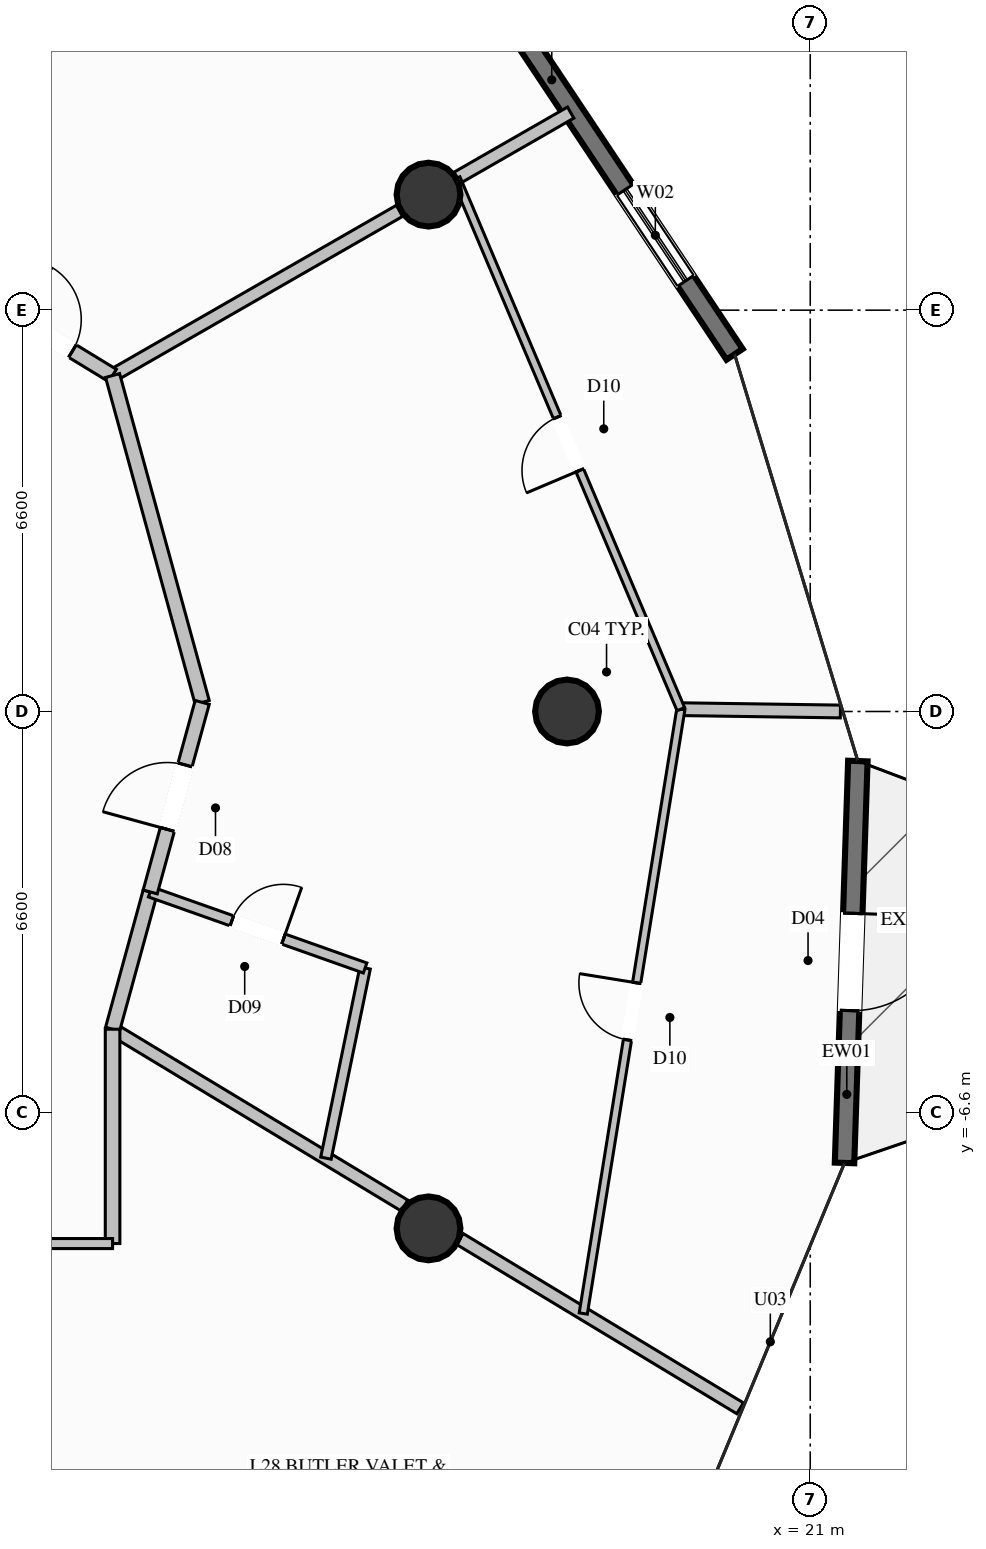
"""IFC4 building model, lengths in metres.
Left out: names, types, materials, properties, quantities, classifications, styles, units other than length and angle.
Written with IfcOpenShell. Run it as: python <this file> out.ifc"""

import sys

from ifc_helpers import new_model, si_unit, direction, frame, frame_2d, origin, origin_2d, place, context, subcontext, project, spatial, rectangle, circle, extrude, element, fill, save


model = new_model("IFC4")
c1 = context("Model", 3, precision=1e-05, world=origin(), true_north=direction((0.0, 1.0)))
c2 = subcontext(c1, "Body", "Model", "MODEL_VIEW")
j1 = project(units=[si_unit("LENGTHUNIT", "METRE"), si_unit("PLANEANGLEUNIT", "RADIAN")], contexts=[c1])
p1 = place(None, origin())
s1 = spatial("IfcSite", under=j1, at=p1, CompositionType="ELEMENT")
p2 = place(p1, origin())
s2 = spatial("IfcBuilding", under=s1, at=p2, CompositionType="ELEMENT")
p3 = place(p2, frame((0.0, 0.0, 113.4)))
s3 = spatial("IfcBuildingStorey", under=s2, at=p3, CompositionType="ELEMENT", Elevation=113.4)
for number, where, z_axis, x_axis in (
    (1, (17.0, 0.0, 0.0), (0.0, 0.0, 1.0), (1.0, 0.0, 0.0)),
    (2, (14.722, 8.5, 0.0), (0.0, 0.0, 1.0), (1.0, 0.0, 0.0)),
    (3, (14.722, -8.5, 0.0), (0.0, 0.0, 1.0), (1.0, 0.0, 0.0)),
):
    element("IfcColumn", number, at=place(p3, frame(where, z_axis=z_axis, x_axis=x_axis)), inside=s3, PredefinedType="COLUMN", context=c2, shape_type="SweptSolid", body=[
        extrude(circle(Radius=0.525, at=origin_2d()), origin(), (0.0, 0.0, 1.0), 3.6),
    ])
p4 = place(p3, frame((21.783, -0.815, 0.0), z_axis=(0.0, 0.0, 1.0), x_axis=(-0.033116914102, -0.999451484566, 0.0)))
e4 = element("IfcWall", 4, at=p4, inside=s3, PredefinedType="SOLIDWALL", context=c2, shape_type="SweptSolid", body=[
    extrude(rectangle(XDim=6.613, YDim=0.32, at=frame_2d((3.306, 0.0))), origin(), (0.0, 0.0, 1.0), 3.35),
])
p5 = place(p4, frame((2.506, 0.0, 0.0)))
e5 = element("IfcOpeningElement", 5, at=p5, cuts=e4, PredefinedType="OPENING", context=c2, shape_type="SweptSolid", body=[
    extrude(rectangle(XDim=1.6, YDim=2.3, at=frame_2d((0.8, 1.15))), frame((0.0, 0.17, 0.0), z_axis=(0.0, -1.0, 0.0), x_axis=(1.0, 0.0, 0.0)), (0.0, 0.0, 1.0), 0.34),
])
p6 = place(p3, frame((15.683, 11.988, 0.0), z_axis=(0.0, 0.0, 1.0), x_axis=(0.554416410256, -0.832239415096, 0.0)))
e6 = element("IfcWall", 6, at=p6, inside=s3, PredefinedType="SOLIDWALL", context=c2, shape_type="SweptSolid", body=[
    extrude(rectangle(XDim=7.346, YDim=0.32, at=frame_2d((3.673, 0.0))), origin(), (0.0, 0.0, 1.0), 3.35),
])
p7 = place(p6, frame((4.095, 0.0, 0.35)))
e7 = element("IfcOpeningElement", 7, at=p7, cuts=e6, PredefinedType="OPENING", context=c2, shape_type="SweptSolid", body=[
    extrude(rectangle(XDim=1.8, YDim=2.6, at=frame_2d((0.9, 1.3))), frame((0.0, 0.17, 0.0), z_axis=(0.0, -1.0, 0.0), x_axis=(1.0, 0.0, 0.0)), (0.0, 0.0, 1.0), 0.34),
])
p8 = place(p3, frame((9.526, 5.525, 0.0), z_axis=(0.0, 0.0, 1.0), x_axis=(0.867314067813, 0.497761295979, 0.0)))
e8 = element("IfcWall", 8, at=p8, inside=s3, PredefinedType="PARTITIONING", context=c2, shape_type="SweptSolid", body=[
    extrude(rectangle(XDim=5.442, YDim=0.21, at=frame_2d((2.721, 0.0))), origin(), (0.0, 0.0, 1.0), 2.718),
])
p9 = place(p3, frame((15.192, 8.777, 0.0), z_axis=(0.0, 0.0, 1.0), x_axis=(0.867341902332, 0.497712793144, 0.0)))
e9 = element("IfcWall", 9, at=p9, inside=s3, PredefinedType="PARTITIONING", context=c2, shape_type="SweptSolid", body=[
    extrude(rectangle(XDim=2.154, YDim=0.21, at=frame_2d((1.077, 0.0))), origin(), (0.0, 0.0, 1.0), 3.35),
])
p10 = place(p3, frame((9.526, -5.225, 0.0), z_axis=(0.0, 0.0, 1.0), x_axis=(0.855972129744, -0.517021965782, 0.0)))
e10 = element("IfcWall", 10, at=p10, inside=s3, PredefinedType="PARTITIONING", context=c2, shape_type="SweptSolid", body=[
    extrude(rectangle(XDim=5.609, YDim=0.21, at=frame_2d((2.804, 0.0))), origin(), (0.0, 0.0, 1.0), 2.718),
])
p11 = place(p3, frame((15.238, -8.675, 0.0), z_axis=(0.0, 0.0, 1.0), x_axis=(0.855964873526, -0.517033978854, 0.0)))
e11 = element("IfcWall", 11, at=p11, inside=s3, PredefinedType="PARTITIONING", context=c2, shape_type="SweptSolid", body=[
    extrude(rectangle(XDim=5.385, YDim=0.21, at=frame_2d((2.692, 0.0))), origin(), (0.0, 0.0, 1.0), 3.35),
])
p12 = place(p3, frame((7.35, 6.85, 0.0), z_axis=(0.0, 0.0, 1.0), x_axis=(0.854057882133, -0.520177982969, 0.0)))
e12 = element("IfcWall", 12, at=p12, inside=s3, PredefinedType="PARTITIONING", context=c2, shape_type="SweptSolid", body=[
    extrude(rectangle(XDim=2.548, YDim=0.24, at=frame_2d((1.274, 0.0))), origin(), (0.0, 0.0, 1.0), 3.35),
])
p13 = place(p12, frame((0.774, 0.0, 0.0)))
e13 = element("IfcOpeningElement", 13, at=p13, cuts=e12, PredefinedType="OPENING", context=c2, shape_type="SweptSolid", body=[
    extrude(rectangle(XDim=1.0, YDim=2.2, at=frame_2d((0.5, 1.1))), frame((0.0, 0.13, 0.0), z_axis=(0.0, -1.0, 0.0), x_axis=(1.0, 0.0, 0.0)), (0.0, 0.0, 1.0), 0.26),
])
p14 = place(p3, frame((9.526, -5.225, 0.0), z_axis=(0.0, 0.0, 1.0), x_axis=(0.264431780812, 0.964404393031, 0.0)))
e14 = element("IfcWall", 14, at=p14, inside=s3, PredefinedType="PARTITIONING", context=c2, shape_type="SweptSolid", body=[
    extrude(rectangle(XDim=2.341, YDim=0.24, at=frame_2d((1.171, 0.0))), origin(), (0.0, 0.0, 1.0), 3.35),
])
p15 = place(p3, frame((13.035, -7.345, 0.0), z_axis=(0.0, 0.0, 1.0), x_axis=(0.201730596841, 0.979441047893, 0.0)))
e15 = element("IfcWall", 15, at=p15, inside=s3, PredefinedType="PLUMBINGWALL", context=c2, shape_type="SweptSolid", body=[
    extrude(rectangle(XDim=3.193, YDim=0.175, at=frame_2d((1.596, 0.0))), origin(), (0.0, 0.0, 1.0), 3.35),
])
p16 = place(p3, frame((10.145, -2.967, 0.0), z_axis=(0.0, 0.0, 1.0), x_axis=(0.94267973016, -0.333698855775, 0.0)))
e16 = element("IfcWall", 16, at=p16, inside=s3, PredefinedType="PLUMBINGWALL", context=c2, shape_type="SweptSolid", body=[
    extrude(rectangle(XDim=3.749, YDim=0.175, at=frame_2d((1.875, 0.0))), origin(), (0.0, 0.0, 1.0), 3.35),
])
p17 = place(p16, frame((1.424, 0.0, 0.0)))
e17 = element("IfcOpeningElement", 17, at=p17, cuts=e16, PredefinedType="OPENING", context=c2, shape_type="SweptSolid", body=[
    extrude(rectangle(XDim=0.9, YDim=2.1, at=frame_2d((0.45, 1.05))), frame((0.0, 0.098, 0.0), z_axis=(0.0, -1.0, 0.0), x_axis=(1.0, 0.0, 0.0)), (0.0, 0.0, 1.0), 0.195),
])
p18 = place(p3, frame((18.872, 0.038, 0.0), z_axis=(0.0, 0.0, 1.0), x_axis=(0.999894683777, -0.014512799653, 0.0)))
e18 = element("IfcWall", 18, at=p18, inside=s3, PredefinedType="PARTITIONING", context=c2, shape_type="SweptSolid", body=[
    extrude(rectangle(XDim=2.624, YDim=0.21, at=frame_2d((1.312, 0.0))), origin(), (0.0, 0.0, 1.0), 3.35),
])
p19 = place(p3, frame((11.0, 0.15, 0.0), z_axis=(0.0, 0.0, 1.0), x_axis=(-0.264488542062, 0.964388827765, 0.0)))
e19 = element("IfcWall", 19, at=p19, inside=s3, PredefinedType="PARTITIONING", context=c2, shape_type="SweptSolid", body=[
    extrude(rectangle(XDim=5.573, YDim=0.24, at=frame_2d((2.787, 0.0))), origin(), (0.0, 0.0, 1.0), 3.35),
])
p20 = place(p3, frame((10.145, -2.967, 0.0), z_axis=(0.0, 0.0, 1.0), x_axis=(0.264529660797, 0.9643775498, 0.0)))
e20 = element("IfcWall", 20, at=p20, inside=s3, PredefinedType="PARTITIONING", context=c2, shape_type="SweptSolid", body=[
    extrude(rectangle(XDim=3.232, YDim=0.24, at=frame_2d((1.616, 0.0))), origin(), (0.0, 0.0, 1.0), 3.35),
])
p21 = place(p20, frame((1.066, 0.0, 0.0)))
e21 = element("IfcOpeningElement", 21, at=p21, cuts=e20, PredefinedType="OPENING", context=c2, shape_type="SweptSolid", body=[
    extrude(rectangle(XDim=1.1, YDim=2.3, at=frame_2d((0.55, 1.15))), frame((0.0, 0.13, 0.0), z_axis=(0.0, -1.0, 0.0), x_axis=(1.0, 0.0, 0.0)), (0.0, 0.0, 1.0), 0.26),
])
p22 = place(p3, frame((17.267, -9.9, 0.0), z_axis=(0.0, 0.0, 1.0), x_axis=(0.159433733404, 0.987208632789, 0.0)))
e22 = element("IfcWall", 22, at=p22, inside=s3, PredefinedType="PARTITIONING", context=c2, shape_type="SweptSolid", body=[
    extrude(rectangle(XDim=10.067, YDim=0.135, at=frame_2d((5.033, 0.0))), origin(), (0.0, 0.0, 1.0), 3.35),
])
p23 = place(p22, frame((4.558, 0.0, 0.0)))
e23 = element("IfcOpeningElement", 23, at=p23, cuts=e22, PredefinedType="OPENING", context=c2, shape_type="SweptSolid", body=[
    extrude(rectangle(XDim=0.95, YDim=2.1, at=frame_2d((0.475, 1.05))), frame((0.0, 0.078, 0.0), z_axis=(0.0, -1.0, 0.0), x_axis=(1.0, 0.0, 0.0)), (0.0, 0.0, 1.0), 0.155),
])
p24 = place(p3, frame((18.872, 0.038, 0.0), z_axis=(0.0, 0.0, 1.0), x_axis=(-0.38987185075, 0.920869122076, 0.0)))
e24 = element("IfcWall", 24, at=p24, inside=s3, PredefinedType="PARTITIONING", context=c2, shape_type="SweptSolid", body=[
    extrude(rectangle(XDim=9.48, YDim=0.135, at=frame_2d((4.74, 0.0))), origin(), (0.0, 0.0, 1.0), 2.879),
])
p25 = place(p24, frame((4.265, 0.0, 0.0)))
e25 = element("IfcOpeningElement", 25, at=p25, cuts=e24, PredefinedType="OPENING", context=c2, shape_type="SweptSolid", body=[
    extrude(rectangle(XDim=0.95, YDim=2.1, at=frame_2d((0.475, 1.05))), frame((0.0, 0.078, 0.0), z_axis=(0.0, -1.0, 0.0), x_axis=(1.0, 0.0, 0.0)), (0.0, 0.0, 1.0), 0.155),
])
p26 = place(p3, frame((5.239, -8.75, 0.0), z_axis=(0.0, 0.0, 1.0), x_axis=(0.584922274278, -0.811089349612, 0.0)))
e26 = element("IfcWall", 26, at=p26, inside=s3, PredefinedType="PARTITIONING", context=c2, shape_type="SweptSolid", body=[
    extrude(rectangle(XDim=12.473, YDim=0.21, at=frame_2d((6.237, 0.0))), origin(), (0.0, 0.0, 1.0), 3.35),
])
p27 = place(p3, frame((9.526, -8.75, 0.0), z_axis=(0.0, 0.0, 1.0), x_axis=(0.0, 1.0, 0.0)))
e27 = element("IfcWall", 27, at=p27, inside=s3, PredefinedType="PARTITIONING", context=c2, shape_type="SweptSolid", body=[
    extrude(rectangle(XDim=3.525, YDim=0.24, at=frame_2d((1.762, 0.0))), origin(), (0.0, 0.0, 1.0), 3.35),
])
p28 = place(p3, frame((5.239, -8.75, 0.0), z_axis=(0.0, 0.0, 1.0), x_axis=(1.0, 0.0, 0.0)))
e28 = element("IfcWall", 28, at=p28, inside=s3, PredefinedType="PARTITIONING", context=c2, shape_type="SweptSolid", body=[
    extrude(rectangle(XDim=4.287, YDim=0.165, at=frame_2d((2.144, 0.0))), origin(), (0.0, 0.0, 1.0), 3.35),
])
p29 = place(p28, frame((1.668, 0.0, 0.0)))
e29 = element("IfcOpeningElement", 29, at=p29, cuts=e28, PredefinedType="OPENING", context=c2, shape_type="SweptSolid", body=[
    extrude(rectangle(XDim=0.95, YDim=2.1, at=frame_2d((0.475, 1.05))), frame((0.0, 0.093, 0.0), z_axis=(0.0, -1.0, 0.0), x_axis=(1.0, 0.0, 0.0)), (0.0, 0.0, 1.0), 0.185),
])
p30 = place(p5, origin())
e30 = element("IfcDoor", 30, at=p30, inside=s3, OperationType="SINGLE_SWING_LEFT", PredefinedType="DOOR", context=c2, shape_type="SweptSolid", body=[
    extrude(rectangle(XDim=1.6, YDim=2.3, at=frame_2d((0.8, 1.15))), frame((0.0, 0.025, 0.0), z_axis=(0.0, -1.0, 0.0), x_axis=(1.0, 0.0, 0.0)), (0.0, 0.0, 1.0), 0.05),
])
fill(e5, e30)
p31 = place(p7, origin())
e31 = element("IfcWindow", 31, at=p31, inside=s3, PartitioningType="SINGLE_PANEL", PredefinedType="WINDOW", context=c2, shape_type="SweptSolid", body=[
    extrude(rectangle(XDim=1.8, YDim=2.6, at=frame_2d((0.9, 1.3))), frame((0.0, 0.03, 0.0), z_axis=(0.0, -1.0, 0.0), x_axis=(1.0, 0.0, 0.0)), (0.0, 0.0, 1.0), 0.06),
])
fill(e7, e31)
p32 = place(p13, origin())
e32 = element("IfcDoor", 32, at=p32, inside=s3, OperationType="SINGLE_SWING_LEFT", PredefinedType="DOOR", context=c2, shape_type="SweptSolid", body=[
    extrude(rectangle(XDim=1.0, YDim=2.2, at=frame_2d((0.5, 1.1))), frame((0.0, 0.025, 0.0), z_axis=(0.0, -1.0, 0.0), x_axis=(1.0, 0.0, 0.0)), (0.0, 0.0, 1.0), 0.05),
])
fill(e13, e32)
p33 = place(p17, origin())
e33 = element("IfcDoor", 33, at=p33, inside=s3, OperationType="SINGLE_SWING_RIGHT", PredefinedType="DOOR", context=c2, shape_type="SweptSolid", body=[
    extrude(rectangle(XDim=0.9, YDim=2.1, at=frame_2d((0.45, 1.05))), frame((0.0, 0.025, 0.0), z_axis=(0.0, -1.0, 0.0), x_axis=(1.0, 0.0, 0.0)), (0.0, 0.0, 1.0), 0.05),
])
fill(e17, e33)
p34 = place(p21, origin())
e34 = element("IfcDoor", 34, at=p34, inside=s3, OperationType="SINGLE_SWING_LEFT", PredefinedType="DOOR", context=c2, shape_type="SweptSolid", body=[
    extrude(rectangle(XDim=1.1, YDim=2.3, at=frame_2d((0.55, 1.15))), frame((0.0, 0.025, 0.0), z_axis=(0.0, -1.0, 0.0), x_axis=(1.0, 0.0, 0.0)), (0.0, 0.0, 1.0), 0.05),
])
fill(e21, e34)
p35 = place(p23, origin())
e35 = element("IfcDoor", 35, at=p35, inside=s3, OperationType="SINGLE_SWING_RIGHT", PredefinedType="DOOR", context=c2, shape_type="SweptSolid", body=[
    extrude(rectangle(XDim=0.95, YDim=2.1, at=frame_2d((0.475, 1.05))), frame((0.0, 0.025, 0.0), z_axis=(0.0, -1.0, 0.0), x_axis=(1.0, 0.0, 0.0)), (0.0, 0.0, 1.0), 0.05),
])
fill(e23, e35)
p36 = place(p25, origin())
e36 = element("IfcDoor", 36, at=p36, inside=s3, OperationType="SINGLE_SWING_LEFT", PredefinedType="DOOR", context=c2, shape_type="SweptSolid", body=[
    extrude(rectangle(XDim=0.95, YDim=2.1, at=frame_2d((0.475, 1.05))), frame((0.0, 0.025, 0.0), z_axis=(0.0, -1.0, 0.0), x_axis=(1.0, 0.0, 0.0)), (0.0, 0.0, 1.0), 0.05),
])
fill(e25, e36)
save(model, sys.argv[1])
